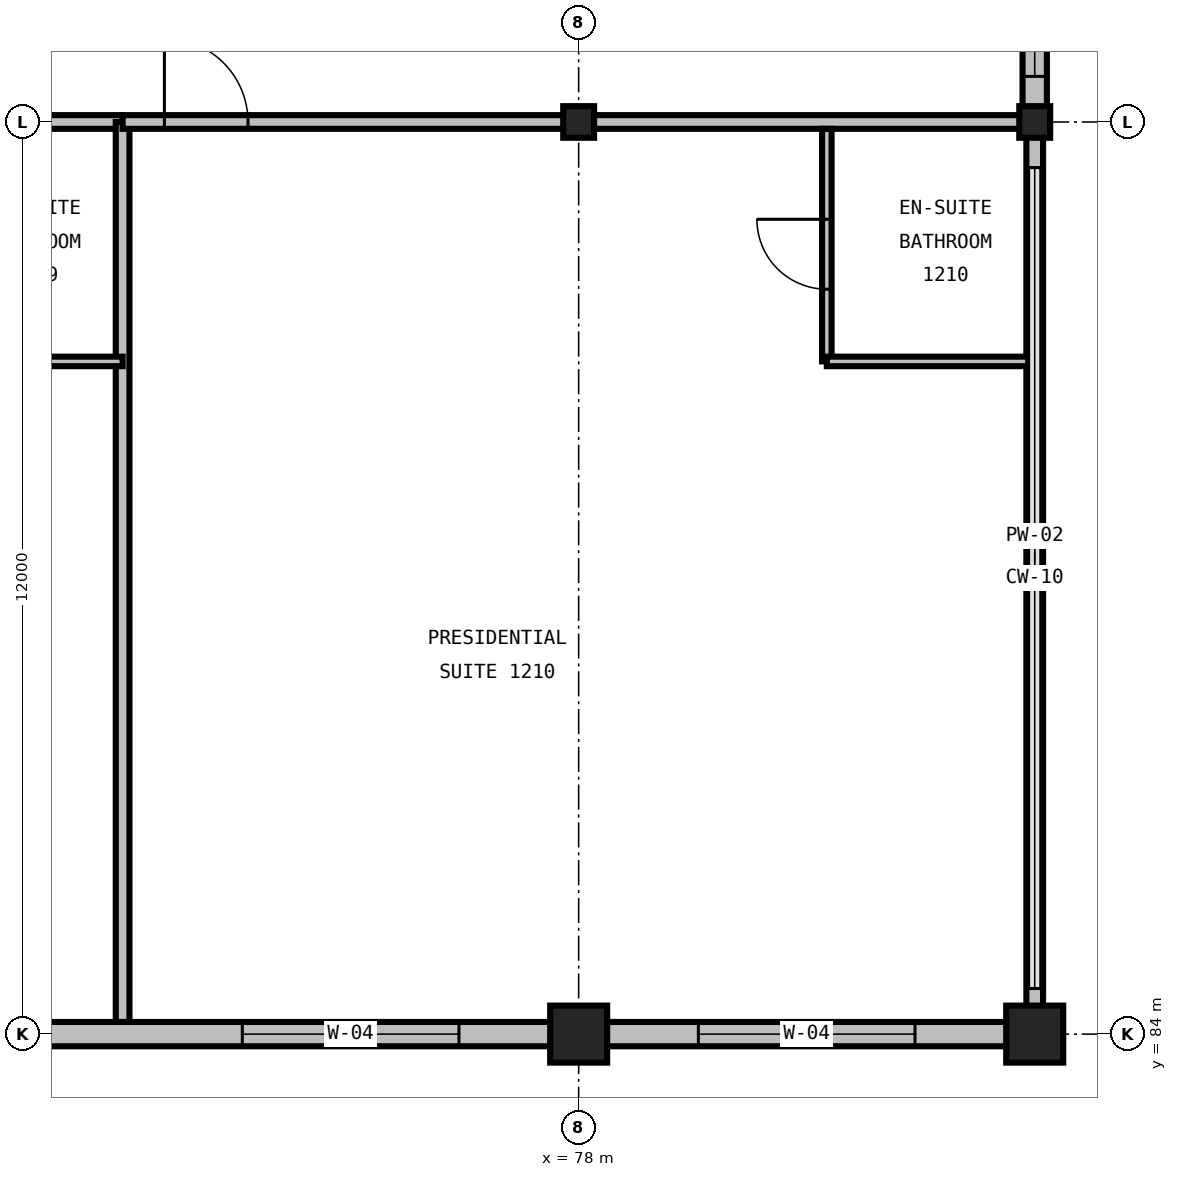
"""IFC4 building model, lengths in metres.
Left out: names, types, materials, properties, quantities, classifications, styles, units other than length and angle.
Written with IfcOpenShell. Run it as: python <this file> out.ifc"""

import sys

from ifc_helpers import new_model, si_unit, direction, frame, frame_2d, origin, origin_2d, place, context, subcontext, project, spatial, rectangle, i_section, extrude, element, fill, save


model = new_model("IFC4")
c1 = context("Model", 3, precision=1e-05, world=origin(), true_north=direction((0.0, 1.0)))
c2 = subcontext(c1, "Body", "Model", "MODEL_VIEW")
j1 = project(units=[si_unit("LENGTHUNIT", "METRE"), si_unit("PLANEANGLEUNIT", "RADIAN")], contexts=[c1])
p1 = place(None, origin())
s1 = spatial("IfcSite", under=j1, at=p1, CompositionType="ELEMENT")
p2 = place(p1, origin())
s2 = spatial("IfcBuilding", under=s1, at=p2, CompositionType="ELEMENT")
p3 = place(p2, frame((0.0, 0.0, 52.8)))
s3 = spatial("IfcBuildingStorey", under=s2, at=p3, CompositionType="ELEMENT", Elevation=52.8)
p4 = place(p3, frame((78.0, 84.0, 0.0), z_axis=(0.0, 0.0, 1.0), x_axis=(1.0, 0.0, 0.0)))
e1 = element("IfcColumn", 1, at=p4, inside=s3, PredefinedType="COLUMN", context=c2, shape_type="SweptSolid", body=[
    extrude(rectangle(XDim=0.75, YDim=0.75, at=origin_2d()), origin(), (0.0, 0.0, 1.0), 3.6),
])
p5 = place(p3, frame((78.0, 96.0, 0.0), z_axis=(0.0, 0.0, 1.0), x_axis=(1.0, 0.0, 0.0)))
e2 = element("IfcColumn", 2, at=p5, inside=s3, PredefinedType="COLUMN", context=c2, shape_type="SweptSolid", body=[
    extrude(i_section(OverallWidth=0.406, OverallDepth=0.416, WebThickness=0.03, FlangeThickness=0.048, FilletRadius=0.031, at=origin_2d()), origin(), (0.0, 0.0, 1.0), 3.6),
])
p6 = place(p3, frame((84.0, 84.0, 0.0), z_axis=(0.0, 0.0, 1.0), x_axis=(1.0, 0.0, 0.0)))
e3 = element("IfcColumn", 3, at=p6, inside=s3, PredefinedType="COLUMN", context=c2, shape_type="SweptSolid", body=[
    extrude(rectangle(XDim=0.75, YDim=0.75, at=origin_2d()), origin(), (0.0, 0.0, 1.0), 3.6),
])
p7 = place(p3, frame((84.0, 96.0, 0.0), z_axis=(0.0, 0.0, 1.0), x_axis=(1.0, 0.0, 0.0)))
e4 = element("IfcColumn", 4, at=p7, inside=s3, PredefinedType="COLUMN", context=c2, shape_type="SweptSolid", body=[
    extrude(i_section(OverallWidth=0.406, OverallDepth=0.416, WebThickness=0.03, FlangeThickness=0.048, FilletRadius=0.031, at=origin_2d()), origin(), (0.0, 0.0, 1.0), 3.6),
])
p8 = place(p3, frame((66.0, 84.0, 0.0), z_axis=(0.0, 0.0, 1.0), x_axis=(1.0, 0.0, 0.0)))
e5 = element("IfcWall", 5, at=p8, inside=s3, PredefinedType="STANDARD", context=c2, shape_type="SweptSolid", body=[
    extrude(rectangle(XDim=12.0, YDim=0.32, at=frame_2d((6.0, 0.0))), origin(), (0.0, 0.0, 1.0), 2.536),
])
p9 = place(p8, frame((1.575, 0.0, 0.7)))
e6 = element("IfcOpeningElement", 6, at=p9, cuts=e5, PredefinedType="OPENING", context=c2, shape_type="SweptSolid", body=[
    extrude(rectangle(XDim=2.85, YDim=1.65, at=frame_2d((1.425, 0.825))), frame((0.0, 0.175, 0.0), z_axis=(0.0, -1.0, 0.0), x_axis=(1.0, 0.0, 0.0)), (0.0, 0.0, 1.0), 0.35),
])
p10 = place(p8, frame((7.575, 0.0, 0.7)))
e7 = element("IfcOpeningElement", 7, at=p10, cuts=e5, PredefinedType="OPENING", context=c2, shape_type="SweptSolid", body=[
    extrude(rectangle(XDim=2.85, YDim=1.65, at=frame_2d((1.425, 0.825))), frame((0.0, 0.175, 0.0), z_axis=(0.0, -1.0, 0.0), x_axis=(1.0, 0.0, 0.0)), (0.0, 0.0, 1.0), 0.35),
])
p11 = place(p3, frame((78.0, 84.0, 0.0), z_axis=(0.0, 0.0, 1.0), x_axis=(1.0, 0.0, 0.0)))
e8 = element("IfcWall", 8, at=p11, inside=s3, PredefinedType="STANDARD", context=c2, shape_type="SweptSolid", body=[
    extrude(rectangle(XDim=6.0, YDim=0.32, at=frame_2d((3.0, 0.0))), origin(), (0.0, 0.0, 1.0), 2.536),
])
p12 = place(p11, frame((1.575, 0.0, 0.7)))
e9 = element("IfcOpeningElement", 9, at=p12, cuts=e8, PredefinedType="OPENING", context=c2, shape_type="SweptSolid", body=[
    extrude(rectangle(XDim=2.85, YDim=1.65, at=frame_2d((1.425, 0.825))), frame((0.0, 0.175, 0.0), z_axis=(0.0, -1.0, 0.0), x_axis=(1.0, 0.0, 0.0)), (0.0, 0.0, 1.0), 0.35),
])
p13 = place(p3, frame((84.0, 84.0, 0.0), z_axis=(0.0, 0.0, 1.0), x_axis=(0.0, 1.0, 0.0)))
e10 = element("IfcWall", 10, at=p13, inside=s3, PredefinedType="PARAPET", context=c2, shape_type="SweptSolid", body=[
    extrude(rectangle(XDim=12.0, YDim=0.22, at=frame_2d((6.0, 0.0))), origin(), (0.0, 0.0, 1.0), 0.2),
])
p14 = place(p3, frame((84.0, 96.0, 0.0), z_axis=(0.0, 0.0, 1.0), x_axis=(0.0, 1.0, 0.0)))
e11 = element("IfcWall", 11, at=p14, inside=s3, PredefinedType="STANDARD", context=c2, shape_type="SweptSolid", body=[
    extrude(rectangle(XDim=9.0, YDim=0.32, at=frame_2d((4.5, 0.0))), origin(), (0.0, 0.0, 1.0), 2.981),
])
p15 = place(p14, frame((0.6, 0.0, 0.85)))
e12 = element("IfcOpeningElement", 12, at=p15, cuts=e11, PredefinedType="OPENING", context=c2, shape_type="SweptSolid", body=[
    extrude(rectangle(XDim=1.8, YDim=1.5, at=frame_2d((0.9, 0.75))), frame((0.0, 0.175, 0.0), z_axis=(0.0, -1.0, 0.0), x_axis=(1.0, 0.0, 0.0)), (0.0, 0.0, 1.0), 0.35),
])
p16 = place(p3, frame((66.0, 96.0, 0.0), z_axis=(0.0, 0.0, 1.0), x_axis=(1.0, 0.0, 0.0)))
e13 = element("IfcWall", 13, at=p16, inside=s3, PredefinedType="PARTITIONING", context=c2, shape_type="SweptSolid", body=[
    extrude(rectangle(XDim=6.0, YDim=0.18, at=frame_2d((3.0, 0.0))), origin(), (0.0, 0.0, 1.0), 2.664),
])
p17 = place(p16, frame((0.77, 0.0, 0.0)))
e14 = element("IfcOpeningElement", 14, at=p17, cuts=e13, PredefinedType="OPENING", context=c2, shape_type="SweptSolid", body=[
    extrude(rectangle(XDim=1.0, YDim=2.15, at=frame_2d((0.5, 1.075))), frame((0.0, 0.105, 0.0), z_axis=(0.0, -1.0, 0.0), x_axis=(1.0, 0.0, 0.0)), (0.0, 0.0, 1.0), 0.21),
])
p18 = place(p3, frame((72.0, 84.16, 0.0), z_axis=(0.0, 0.0, 1.0), x_axis=(0.0, 1.0, 0.0)))
e15 = element("IfcWall", 15, at=p18, inside=s3, PredefinedType="PARTITIONING", context=c2, shape_type="SweptSolid", body=[
    extrude(rectangle(XDim=11.84, YDim=0.18, at=frame_2d((5.92, 0.0))), origin(), (0.0, 0.0, 1.0), 3.29),
])
p19 = place(p3, frame((69.48, 92.85, 0.0), z_axis=(0.0, 0.0, 1.0), x_axis=(1.0, 0.0, 0.0)))
e16 = element("IfcWall", 16, at=p19, inside=s3, PredefinedType="PARTITIONING", context=c2, shape_type="SweptSolid", body=[
    extrude(rectangle(XDim=2.52, YDim=0.125, at=frame_2d((1.26, 0.0))), origin(), (0.0, 0.0, 1.0), 3.29),
])
p20 = place(p3, frame((72.0, 96.0, 0.0), z_axis=(0.0, 0.0, 1.0), x_axis=(1.0, 0.0, 0.0)))
e17 = element("IfcWall", 17, at=p20, inside=s3, PredefinedType="PARTITIONING", context=c2, shape_type="SweptSolid", body=[
    extrude(rectangle(XDim=11.915, YDim=0.18, at=frame_2d((5.957, 0.0))), origin(), (0.0, 0.0, 1.0), 2.664),
])
p21 = place(p20, frame((0.55, 0.0, 0.0)))
e18 = element("IfcOpeningElement", 18, at=p21, cuts=e17, PredefinedType="OPENING", context=c2, shape_type="SweptSolid", body=[
    extrude(rectangle(XDim=1.1, YDim=2.2, at=frame_2d((0.55, 1.1))), frame((0.0, 0.105, 0.0), z_axis=(0.0, -1.0, 0.0), x_axis=(1.0, 0.0, 0.0)), (0.0, 0.0, 1.0), 0.21),
])
p22 = place(p3, frame((81.265, 92.85, 0.0), z_axis=(0.0, 0.0, 1.0), x_axis=(0.0, 1.0, 0.0)))
e19 = element("IfcWall", 19, at=p22, inside=s3, PredefinedType="PARTITIONING", context=c2, shape_type="SweptSolid", body=[
    extrude(rectangle(XDim=3.06, YDim=0.125, at=frame_2d((1.53, 0.0))), origin(), (0.0, 0.0, 1.0), 3.29),
])
p23 = place(p22, frame((0.95, 0.0, 0.0)))
e20 = element("IfcOpeningElement", 20, at=p23, cuts=e19, PredefinedType="OPENING", context=c2, shape_type="SweptSolid", body=[
    extrude(rectangle(XDim=0.92, YDim=2.1, at=frame_2d((0.46, 1.05))), frame((0.0, 0.077, 0.0), z_axis=(0.0, -1.0, 0.0), x_axis=(1.0, 0.0, 0.0)), (0.0, 0.0, 1.0), 0.155),
])
p24 = place(p3, frame((81.265, 92.85, 0.0), z_axis=(0.0, 0.0, 1.0), x_axis=(1.0, 0.0, 0.0)))
e21 = element("IfcWall", 21, at=p24, inside=s3, PredefinedType="PARTITIONING", context=c2, shape_type="SweptSolid", body=[
    extrude(rectangle(XDim=2.65, YDim=0.125, at=frame_2d((1.325, 0.0))), origin(), (0.0, 0.0, 1.0), 3.29),
])
p25 = place(p10, origin())
e22 = element("IfcWindow", 22, at=p25, inside=s3, PartitioningType="TRIPLE_PANEL_VERTICAL", PredefinedType="WINDOW", context=c2, shape_type="SweptSolid", body=[
    extrude(rectangle(XDim=2.85, YDim=1.65, at=frame_2d((1.425, 0.825))), frame((0.0, 0.03, 0.0), z_axis=(0.0, -1.0, 0.0), x_axis=(1.0, 0.0, 0.0)), (0.0, 0.0, 1.0), 0.06),
])
fill(e7, e22)
p26 = place(p12, origin())
e23 = element("IfcWindow", 23, at=p26, inside=s3, PartitioningType="TRIPLE_PANEL_VERTICAL", PredefinedType="WINDOW", context=c2, shape_type="SweptSolid", body=[
    extrude(rectangle(XDim=2.85, YDim=1.65, at=frame_2d((1.425, 0.825))), frame((0.0, 0.03, 0.0), z_axis=(0.0, -1.0, 0.0), x_axis=(1.0, 0.0, 0.0)), (0.0, 0.0, 1.0), 0.06),
])
fill(e9, e23)
p27 = place(p15, origin())
e24 = element("IfcWindow", 24, at=p27, inside=s3, PartitioningType="SINGLE_PANEL", PredefinedType="WINDOW", context=c2, shape_type="SweptSolid", body=[
    extrude(rectangle(XDim=1.8, YDim=1.5, at=frame_2d((0.9, 0.75))), frame((0.0, 0.03, 0.0), z_axis=(0.0, -1.0, 0.0), x_axis=(1.0, 0.0, 0.0)), (0.0, 0.0, 1.0), 0.06),
])
fill(e12, e24)
p28 = place(p21, origin())
e25 = element("IfcDoor", 25, at=p28, inside=s3, OperationType="SINGLE_SWING_LEFT", PredefinedType="DOOR", context=c2, shape_type="SweptSolid", body=[
    extrude(rectangle(XDim=1.1, YDim=2.2, at=frame_2d((0.55, 1.1))), frame((0.0, 0.025, 0.0), z_axis=(0.0, -1.0, 0.0), x_axis=(1.0, 0.0, 0.0)), (0.0, 0.0, 1.0), 0.05),
])
fill(e18, e25)
p29 = place(p23, origin())
e26 = element("IfcDoor", 26, at=p29, inside=s3, OperationType="SINGLE_SWING_RIGHT", PredefinedType="DOOR", context=c2, shape_type="SweptSolid", body=[
    extrude(rectangle(XDim=0.92, YDim=2.1, at=frame_2d((0.46, 1.05))), frame((0.0, 0.025, 0.0), z_axis=(0.0, -1.0, 0.0), x_axis=(1.0, 0.0, 0.0)), (0.0, 0.0, 1.0), 0.05),
])
fill(e20, e26)
save(model, sys.argv[1])
